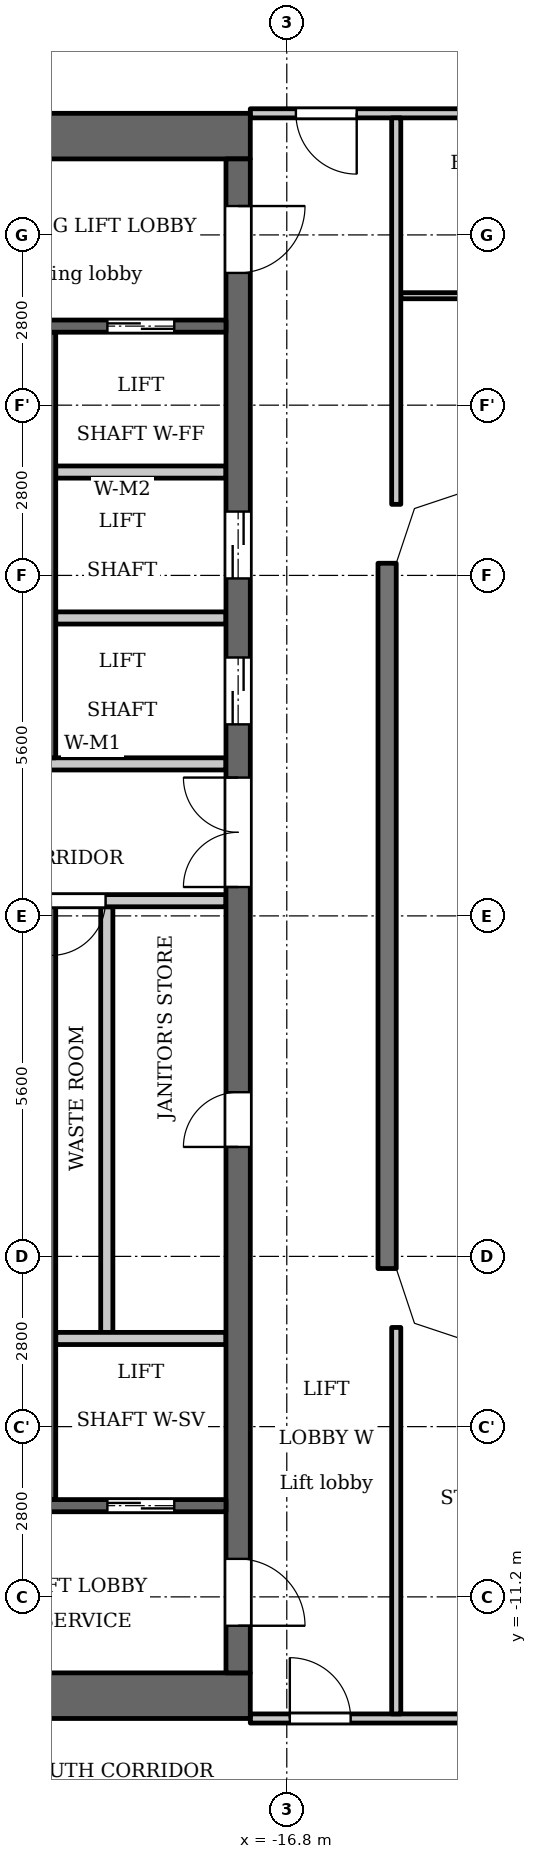
"""IFC4 building model, lengths in metres.
Left out: names, types, materials, properties, quantities, classifications, styles, units other than length and angle.
Written with IfcOpenShell. Run it as: python <this file> out.ifc"""

import sys

from ifc_helpers import new_model, si_unit, direction, frame, frame_2d, origin, place, context, subcontext, project, spatial, polyline, rectangle, outline, extrude, element, fill, save


model = new_model("IFC4")
c1 = context("Model", 3, precision=1e-05, world=origin(), true_north=direction((0.0, 1.0)))
c2 = subcontext(c1, "Body", "Model", "MODEL_VIEW")
j1 = project(units=[si_unit("LENGTHUNIT", "METRE"), si_unit("PLANEANGLEUNIT", "RADIAN")], contexts=[c1])
p1 = place(None, origin())
s1 = spatial("IfcSite", under=j1, at=p1, CompositionType="ELEMENT")
p2 = place(p1, origin())
s2 = spatial("IfcBuilding", under=s1, at=p2, CompositionType="ELEMENT")
p3 = place(p2, frame((0.0, 0.0, 209.9)))
s3 = spatial("IfcBuildingStorey", under=s2, at=p3, CompositionType="ELEMENT", Elevation=209.9)
p4 = place(p3, frame((-15.15, -5.8, 0.0), z_axis=(0.0, 0.0, 1.0), x_axis=(0.0, 1.0, 0.0)))
e1 = element("IfcWall", 1, at=p4, inside=s3, PredefinedType="SOLIDWALL", context=c2, shape_type="SweptSolid", body=[
    extrude(rectangle(XDim=11.6, YDim=0.3, at=frame_2d((5.8, 0.0))), origin(), (0.0, 0.0, 1.0), 3.2),
])
p5 = place(p3, frame((-20.7, 2.6, 0.0), z_axis=(0.0, 0.0, 1.0), x_axis=(0.0, 1.0, 0.0)))
e2 = element("IfcWall", 2, at=p5, inside=s3, PredefinedType="SHEAR", context=c2, shape_type="SweptSolid", body=[
    extrude(rectangle(XDim=7.0, YDim=0.2, at=frame_2d((3.5, 0.0))), origin(), (0.0, 0.0, 1.0), 3.2),
])
p6 = place(p3, frame((-20.7, -9.6, 0.0), z_axis=(0.0, 0.0, 1.0), x_axis=(0.0, 1.0, 0.0)))
e3 = element("IfcWall", 3, at=p6, inside=s3, PredefinedType="SHEAR", context=c2, shape_type="SweptSolid", body=[
    extrude(rectangle(XDim=9.75, YDim=0.2, at=frame_2d((4.875, 0.0))), origin(), (0.0, 0.0, 1.0), 3.2),
])
for number, where, z_axis, x_axis in (
    (4, (-17.4, 12.825, 0.0), (0.0, 0.0, 1.0), (-1.0, 0.0, 0.0)),
    (5, (-17.4, -12.825, 0.0), (0.0, 0.0, 1.0), (-1.0, 0.0, 0.0)),
):
    element("IfcWall", number, at=place(p3, frame(where, z_axis=z_axis, x_axis=x_axis)), inside=s3, PredefinedType="SHEAR", context=c2, shape_type="SweptSolid", body=[
        extrude(rectangle(XDim=7.6, YDim=0.75, at=frame_2d((3.8, 0.0))), origin(), (0.0, 0.0, 1.0), 3.2),
    ])
p7 = place(p3, frame((-19.76, -6.85, 0.0), z_axis=(0.0, 0.0, 1.0), x_axis=(0.0, 1.0, 0.0)))
e6 = element("IfcWall", 6, at=p7, inside=s3, PredefinedType="PARTITIONING", context=c2, shape_type="SweptSolid", body=[
    extrude(rectangle(XDim=7.0, YDim=0.2, at=frame_2d((3.5, 0.0))), origin(), (0.0, 0.0, 1.0), 3.2),
])
p8 = place(p3, frame((-17.6, -12.45, 0.0), z_axis=(0.0, 0.0, 1.0), x_axis=(0.0, 1.0, 0.0)))
e7 = element("IfcWall", 7, at=p8, inside=s3, PredefinedType="SHEAR", context=c2, shape_type="SweptSolid", body=[
    extrude(rectangle(XDim=24.9, YDim=0.4, at=frame_2d((12.45, 0.0))), origin(), (0.0, 0.0, 1.0), 3.2),
])
p9 = place(p8, frame((8.65, 0.0, 0.0)))
e8 = element("IfcOpeningElement", 8, at=p9, cuts=e7, PredefinedType="OPENING", context=c2, shape_type="SweptSolid", body=[
    extrude(rectangle(XDim=0.9, YDim=2.1, at=frame_2d((0.45, 1.05))), frame((0.0, 0.21, 0.0), z_axis=(0.0, -1.0, 0.0), x_axis=(1.0, 0.0, 0.0)), (0.0, 0.0, 1.0), 0.42),
])
p10 = place(p8, frame((15.6, 0.0, 0.0)))
e9 = element("IfcOpeningElement", 9, at=p10, cuts=e7, PredefinedType="OPENING", context=c2, shape_type="SweptSolid", body=[
    extrude(rectangle(XDim=1.1, YDim=2.1, at=frame_2d((0.55, 1.05))), frame((0.0, 0.21, 0.0), z_axis=(0.0, -1.0, 0.0), x_axis=(1.0, 0.0, 0.0)), (0.0, 0.0, 1.0), 0.42),
])
p11 = place(p8, frame((18.0, 0.0, 0.0)))
e10 = element("IfcOpeningElement", 10, at=p11, cuts=e7, PredefinedType="OPENING", context=c2, shape_type="SweptSolid", body=[
    extrude(rectangle(XDim=1.1, YDim=2.1, at=frame_2d((0.55, 1.05))), frame((0.0, 0.21, 0.0), z_axis=(0.0, -1.0, 0.0), x_axis=(1.0, 0.0, 0.0)), (0.0, 0.0, 1.0), 0.42),
])
p12 = place(p8, frame((23.025, 0.0, 0.0)))
e11 = element("IfcOpeningElement", 11, at=p12, cuts=e7, PredefinedType="OPENING", context=c2, shape_type="SweptSolid", body=[
    extrude(rectangle(XDim=1.1, YDim=2.1, at=frame_2d((0.55, 1.05))), frame((0.0, 0.21, 0.0), z_axis=(0.0, -1.0, 0.0), x_axis=(1.0, 0.0, 0.0)), (0.0, 0.0, 1.0), 0.42),
])
p13 = place(p8, frame((0.775, 0.0, 0.0)))
e12 = element("IfcOpeningElement", 12, at=p13, cuts=e7, PredefinedType="OPENING", context=c2, shape_type="SweptSolid", body=[
    extrude(rectangle(XDim=1.1, YDim=2.1, at=frame_2d((0.55, 1.05))), frame((0.0, 0.21, 0.0), z_axis=(0.0, -1.0, 0.0), x_axis=(1.0, 0.0, 0.0)), (0.0, 0.0, 1.0), 0.42),
])
p14 = place(p8, frame((12.925, 0.0, 0.0)))
e13 = element("IfcOpeningElement", 13, at=p14, cuts=e7, PredefinedType="OPENING", context=c2, shape_type="SweptSolid", body=[
    extrude(rectangle(XDim=1.8, YDim=2.1, at=frame_2d((0.9, 1.05))), frame((0.0, 0.21, 0.0), z_axis=(0.0, -1.0, 0.0), x_axis=(1.0, 0.0, 0.0)), (0.0, 0.0, 1.0), 0.42),
])
p15 = place(p3, frame((-17.8, -9.7, 0.0), z_axis=(0.0, 0.0, 1.0), x_axis=(-1.0, 0.0, 0.0)))
e14 = element("IfcWall", 14, at=p15, inside=s3, PredefinedType="SHEAR", context=c2, shape_type="SweptSolid", body=[
    extrude(rectangle(XDim=5.65, YDim=0.2, at=frame_2d((2.825, 0.0))), origin(), (0.0, 0.0, 1.0), 3.2),
])
p16 = place(p15, frame((0.85, 0.0, 0.0)))
e15 = element("IfcOpeningElement", 15, at=p16, cuts=e14, PredefinedType="OPENING", context=c2, shape_type="SweptSolid", body=[
    extrude(rectangle(XDim=1.1, YDim=2.1, at=frame_2d((0.55, 1.05))), frame((0.0, 0.11, 0.0), z_axis=(0.0, -1.0, 0.0), x_axis=(1.0, 0.0, 0.0)), (0.0, 0.0, 1.0), 0.22),
])
p17 = place(p15, frame((3.75, 0.0, 0.0)))
e16 = element("IfcOpeningElement", 16, at=p17, cuts=e14, PredefinedType="OPENING", context=c2, shape_type="SweptSolid", body=[
    extrude(rectangle(XDim=1.1, YDim=2.1, at=frame_2d((0.55, 1.05))), frame((0.0, 0.11, 0.0), z_axis=(0.0, -1.0, 0.0), x_axis=(1.0, 0.0, 0.0)), (0.0, 0.0, 1.0), 0.22),
])
p18 = place(p3, frame((-17.8, -6.95, 0.0), z_axis=(0.0, 0.0, 1.0), x_axis=(-1.0, 0.0, 0.0)))
e17 = element("IfcWall", 17, at=p18, inside=s3, PredefinedType="PARTITIONING", context=c2, shape_type="SweptSolid", body=[
    extrude(rectangle(XDim=2.8, YDim=0.2, at=frame_2d((1.4, 0.0))), origin(), (0.0, 0.0, 1.0), 3.2),
])
p19 = place(p3, frame((-17.8, 0.25, 0.0), z_axis=(0.0, 0.0, 1.0), x_axis=(-1.0, 0.0, 0.0)))
e18 = element("IfcWall", 18, at=p19, inside=s3, PredefinedType="PARTITIONING", context=c2, shape_type="SweptSolid", body=[
    extrude(rectangle(XDim=3.0, YDim=0.2, at=frame_2d((1.5, 0.0))), origin(), (0.0, 0.0, 1.0), 3.2),
])
p20 = place(p19, frame((1.98, 0.0, 0.0)))
e19 = element("IfcOpeningElement", 19, at=p20, cuts=e18, PredefinedType="OPENING", context=c2, shape_type="SweptSolid", body=[
    extrude(rectangle(XDim=0.9, YDim=2.1, at=frame_2d((0.45, 1.05))), frame((0.0, 0.11, 0.0), z_axis=(0.0, -1.0, 0.0), x_axis=(1.0, 0.0, 0.0)), (0.0, 0.0, 1.0), 0.22),
])
p21 = place(p3, frame((-17.8, 2.5, 0.0), z_axis=(0.0, 0.0, 1.0), x_axis=(-1.0, 0.0, 0.0)))
e20 = element("IfcWall", 20, at=p21, inside=s3, PredefinedType="PARTITIONING", context=c2, shape_type="SweptSolid", body=[
    extrude(rectangle(XDim=3.0, YDim=0.2, at=frame_2d((1.5, 0.0))), origin(), (0.0, 0.0, 1.0), 3.2),
])
for number, where, z_axis, x_axis in (
    (21, (-17.8, 4.9, 0.0), (0.0, 0.0, 1.0), (-1.0, 0.0, 0.0)),
    (22, (-17.8, 7.3, 0.0), (0.0, 0.0, 1.0), (-1.0, 0.0, 0.0)),
):
    element("IfcWall", number, at=place(p3, frame(where, z_axis=z_axis, x_axis=x_axis)), inside=s3, PredefinedType="PARTITIONING", context=c2, shape_type="SweptSolid", body=[
        extrude(rectangle(XDim=2.8, YDim=0.2, at=frame_2d((1.4, 0.0))), origin(), (0.0, 0.0, 1.0), 3.2),
    ])
p22 = place(p3, frame((-17.8, 9.7, 0.0), z_axis=(0.0, 0.0, 1.0), x_axis=(-1.0, 0.0, 0.0)))
e23 = element("IfcWall", 23, at=p22, inside=s3, PredefinedType="SHEAR", context=c2, shape_type="SweptSolid", body=[
    extrude(rectangle(XDim=5.65, YDim=0.2, at=frame_2d((2.825, 0.0))), origin(), (0.0, 0.0, 1.0), 3.2),
])
p23 = place(p22, frame((0.85, 0.0, 0.0)))
e24 = element("IfcOpeningElement", 24, at=p23, cuts=e23, PredefinedType="OPENING", context=c2, shape_type="SweptSolid", body=[
    extrude(rectangle(XDim=1.1, YDim=2.1, at=frame_2d((0.55, 1.05))), frame((0.0, 0.11, 0.0), z_axis=(0.0, -1.0, 0.0), x_axis=(1.0, 0.0, 0.0)), (0.0, 0.0, 1.0), 0.22),
])
p24 = place(p22, frame((3.75, 0.0, 0.0)))
e25 = element("IfcOpeningElement", 25, at=p24, cuts=e23, PredefinedType="OPENING", context=c2, shape_type="SweptSolid", body=[
    extrude(rectangle(XDim=1.1, YDim=2.1, at=frame_2d((0.55, 1.05))), frame((0.0, 0.11, 0.0), z_axis=(0.0, -1.0, 0.0), x_axis=(1.0, 0.0, 0.0)), (0.0, 0.0, 1.0), 0.22),
])
p25 = place(p3, frame((-17.4, -13.2, 0.0), z_axis=(0.0, 0.0, 1.0), x_axis=(1.0, 0.0, 0.0)))
e26 = element("IfcWall", 26, at=p25, inside=s3, PredefinedType="PARTITIONING", context=c2, shape_type="SweptSolid", body=[
    extrude(rectangle(XDim=34.8, YDim=0.15, at=frame_2d((17.4, 0.0))), origin(), (0.0, 0.0, 1.0), 3.2),
])
p26 = place(p25, frame((0.65, 0.0, 0.0)))
e27 = element("IfcOpeningElement", 27, at=p26, cuts=e26, PredefinedType="OPENING", context=c2, shape_type="SweptSolid", body=[
    extrude(rectangle(XDim=1.0, YDim=2.1, at=frame_2d((0.5, 1.05))), frame((0.0, 0.085, 0.0), z_axis=(0.0, -1.0, 0.0), x_axis=(1.0, 0.0, 0.0)), (0.0, 0.0, 1.0), 0.17),
])
p27 = place(p25, frame((33.05, 0.0, 0.0)))
e28 = element("IfcOpeningElement", 28, at=p27, cuts=e26, PredefinedType="OPENING", context=c2, shape_type="SweptSolid", body=[
    extrude(rectangle(XDim=1.0, YDim=2.1, at=frame_2d((0.5, 1.05))), frame((0.0, 0.085, 0.0), z_axis=(0.0, -1.0, 0.0), x_axis=(1.0, 0.0, 0.0)), (0.0, 0.0, 1.0), 0.17),
])
p28 = place(p25, frame((4.55, 0.0, 0.0)))
e29 = element("IfcOpeningElement", 29, at=p28, cuts=e26, PredefinedType="OPENING", context=c2, shape_type="SweptSolid", body=[
    extrude(rectangle(XDim=1.0, YDim=2.1, at=frame_2d((0.5, 1.05))), frame((0.0, 0.085, 0.0), z_axis=(0.0, -1.0, 0.0), x_axis=(1.0, 0.0, 0.0)), (0.0, 0.0, 1.0), 0.17),
])
p29 = place(p25, frame((6.9, 0.0, 0.0)))
e30 = element("IfcOpeningElement", 30, at=p29, cuts=e26, PredefinedType="OPENING", context=c2, shape_type="SweptSolid", body=[
    extrude(rectangle(XDim=1.0, YDim=2.1, at=frame_2d((0.5, 1.05))), frame((0.0, 0.085, 0.0), z_axis=(0.0, -1.0, 0.0), x_axis=(1.0, 0.0, 0.0)), (0.0, 0.0, 1.0), 0.17),
])
p30 = place(p25, frame((15.75, 0.0, 0.0)))
e31 = element("IfcOpeningElement", 31, at=p30, cuts=e26, PredefinedType="OPENING", context=c2, shape_type="SweptSolid", body=[
    extrude(rectangle(XDim=1.0, YDim=2.1, at=frame_2d((0.5, 1.05))), frame((0.0, 0.085, 0.0), z_axis=(0.0, -1.0, 0.0), x_axis=(1.0, 0.0, 0.0)), (0.0, 0.0, 1.0), 0.17),
])
p31 = place(p25, frame((18.1, 0.0, 0.0)))
e32 = element("IfcOpeningElement", 32, at=p31, cuts=e26, PredefinedType="OPENING", context=c2, shape_type="SweptSolid", body=[
    extrude(rectangle(XDim=1.0, YDim=2.1, at=frame_2d((0.5, 1.05))), frame((0.0, 0.085, 0.0), z_axis=(0.0, -1.0, 0.0), x_axis=(1.0, 0.0, 0.0)), (0.0, 0.0, 1.0), 0.17),
])
p32 = place(p25, frame((26.95, 0.0, 0.0)))
e33 = element("IfcOpeningElement", 33, at=p32, cuts=e26, PredefinedType="OPENING", context=c2, shape_type="SweptSolid", body=[
    extrude(rectangle(XDim=1.0, YDim=2.1, at=frame_2d((0.5, 1.05))), frame((0.0, 0.085, 0.0), z_axis=(0.0, -1.0, 0.0), x_axis=(1.0, 0.0, 0.0)), (0.0, 0.0, 1.0), 0.17),
])
p33 = place(p25, frame((29.25, 0.0, 0.0)))
e34 = element("IfcOpeningElement", 34, at=p33, cuts=e26, PredefinedType="OPENING", context=c2, shape_type="SweptSolid", body=[
    extrude(rectangle(XDim=1.0, YDim=2.1, at=frame_2d((0.5, 1.05))), frame((0.0, 0.085, 0.0), z_axis=(0.0, -1.0, 0.0), x_axis=(1.0, 0.0, 0.0)), (0.0, 0.0, 1.0), 0.17),
])
p34 = place(p3, frame((-14.925, 10.2, 0.0), z_axis=(0.0, 0.0, 1.0), x_axis=(1.0, 0.0, 0.0)))
e35 = element("IfcWall", 35, at=p34, inside=s3, PredefinedType="PARTITIONING", context=c2, shape_type="SweptSolid", body=[
    extrude(rectangle(XDim=29.85, YDim=0.1, at=frame_2d((14.925, 0.0))), origin(), (0.0, 0.0, 1.0), 3.2),
])
p35 = place(p34, frame((13.475, 0.0, 0.0)))
e36 = element("IfcOpeningElement", 36, at=p35, cuts=e35, PredefinedType="OPENING", context=c2, shape_type="SweptSolid", body=[
    extrude(rectangle(XDim=0.9, YDim=2.1, at=frame_2d((0.45, 1.05))), frame((0.0, 0.06, 0.0), z_axis=(0.0, -1.0, 0.0), x_axis=(1.0, 0.0, 0.0)), (0.0, 0.0, 1.0), 0.12),
])
p36 = place(p34, frame((4.375, 0.0, 0.0)))
e37 = element("IfcOpeningElement", 37, at=p36, cuts=e35, PredefinedType="OPENING", context=c2, shape_type="SweptSolid", body=[
    extrude(rectangle(XDim=0.9, YDim=2.1, at=frame_2d((0.45, 1.05))), frame((0.0, 0.06, 0.0), z_axis=(0.0, -1.0, 0.0), x_axis=(1.0, 0.0, 0.0)), (0.0, 0.0, 1.0), 0.12),
])
p37 = place(p34, frame((19.075, 0.0, 0.0)))
e38 = element("IfcOpeningElement", 38, at=p37, cuts=e35, PredefinedType="OPENING", context=c2, shape_type="SweptSolid", body=[
    extrude(rectangle(XDim=0.9, YDim=2.1, at=frame_2d((0.45, 1.05))), frame((0.0, 0.06, 0.0), z_axis=(0.0, -1.0, 0.0), x_axis=(1.0, 0.0, 0.0)), (0.0, 0.0, 1.0), 0.12),
])
p38 = place(p34, frame((21.175, 0.0, 0.0)))
e39 = element("IfcOpeningElement", 39, at=p38, cuts=e35, PredefinedType="OPENING", context=c2, shape_type="SweptSolid", body=[
    extrude(rectangle(XDim=0.9, YDim=2.1, at=frame_2d((0.45, 1.05))), frame((0.0, 0.06, 0.0), z_axis=(0.0, -1.0, 0.0), x_axis=(1.0, 0.0, 0.0)), (0.0, 0.0, 1.0), 0.12),
])
p39 = place(p3, frame((-17.4, 13.2, 0.0), z_axis=(0.0, 0.0, 1.0), x_axis=(1.0, 0.0, 0.0)))
e40 = element("IfcWall", 40, at=p39, inside=s3, PredefinedType="PARTITIONING", context=c2, shape_type="SweptSolid", body=[
    extrude(rectangle(XDim=34.8, YDim=0.15, at=frame_2d((17.4, 0.0))), origin(), (0.0, 0.0, 1.0), 3.2),
])
p40 = place(p39, frame((0.75, 0.0, 0.0)))
e41 = element("IfcOpeningElement", 41, at=p40, cuts=e40, PredefinedType="OPENING", context=c2, shape_type="SweptSolid", body=[
    extrude(rectangle(XDim=1.0, YDim=2.1, at=frame_2d((0.5, 1.05))), frame((0.0, 0.085, 0.0), z_axis=(0.0, -1.0, 0.0), x_axis=(1.0, 0.0, 0.0)), (0.0, 0.0, 1.0), 0.17),
])
p41 = place(p39, frame((33.15, 0.0, 0.0)))
e42 = element("IfcOpeningElement", 42, at=p41, cuts=e40, PredefinedType="OPENING", context=c2, shape_type="SweptSolid", body=[
    extrude(rectangle(XDim=1.0, YDim=2.1, at=frame_2d((0.5, 1.05))), frame((0.0, 0.085, 0.0), z_axis=(0.0, -1.0, 0.0), x_axis=(1.0, 0.0, 0.0)), (0.0, 0.0, 1.0), 0.17),
])
p42 = place(p39, frame((12.45, 0.0, 0.0)))
e43 = element("IfcOpeningElement", 43, at=p42, cuts=e40, PredefinedType="OPENING", context=c2, shape_type="SweptSolid", body=[
    extrude(rectangle(XDim=1.0, YDim=2.1, at=frame_2d((0.5, 1.05))), frame((0.0, 0.085, 0.0), z_axis=(0.0, -1.0, 0.0), x_axis=(1.0, 0.0, 0.0)), (0.0, 0.0, 1.0), 0.17),
])
p43 = place(p39, frame((18.05, 0.0, 0.0)))
e44 = element("IfcOpeningElement", 44, at=p43, cuts=e40, PredefinedType="OPENING", context=c2, shape_type="SweptSolid", body=[
    extrude(rectangle(XDim=1.0, YDim=2.1, at=frame_2d((0.5, 1.05))), frame((0.0, 0.085, 0.0), z_axis=(0.0, -1.0, 0.0), x_axis=(1.0, 0.0, 0.0)), (0.0, 0.0, 1.0), 0.17),
])
for number, where, z_axis, x_axis in (
    (45, (-15.0, -13.125, 0.0), (0.0, 0.0, 1.0), (0.0, 1.0, 0.0)),
    (46, (-15.0, 6.769, 0.0), (0.0, 0.0, 1.0), (0.0, 1.0, 0.0)),
):
    element("IfcWall", number, at=place(p3, frame(where, z_axis=z_axis, x_axis=x_axis)), inside=s3, PredefinedType="PARTITIONING", context=c2, shape_type="SweptSolid", body=[
        extrude(rectangle(XDim=6.356, YDim=0.15, at=frame_2d((3.178, 0.0))), origin(), (0.0, 0.0, 1.0), 3.2),
    ])
p44 = place(p3, origin())
e47 = element("IfcWall", 47, at=p44, inside=s3, PredefinedType="SOLIDWALL", context=c2, shape_type="SweptSolid", body=[
    extrude(outline(polyline([(-13.849, 7.3), (-14.937, 6.937), (-15.3, 5.849), (-15.3, 5.8), (-15.0, 5.8), (-14.7, 6.7), (-13.8, 7.0), (-13.8, 7.3), (-13.849, 7.3)])), origin(), (0.0, 0.0, 1.0), 3.2),
])
e48 = element("IfcWall", 48, at=p44, inside=s3, PredefinedType="SOLIDWALL", context=c2, shape_type="SweptSolid", body=[
    extrude(outline(polyline([(-14.937, -6.937), (-13.849, -7.3), (-13.8, -7.3), (-13.8, -7.0), (-14.7, -6.7), (-15.0, -5.8), (-15.3, -5.8), (-15.3, -5.849), (-14.937, -6.937)])), origin(), (0.0, 0.0, 1.0), 3.2),
])
p45 = place(p16, origin())
e49 = element("IfcDoor", 49, at=p45, inside=s3, OperationType="DOUBLE_DOOR_SLIDING", PredefinedType="DOOR", context=c2, shape_type="SweptSolid", body=[
    extrude(rectangle(XDim=1.1, YDim=2.1, at=frame_2d((0.55, 1.05))), frame((0.0, 0.025, 0.0), z_axis=(0.0, -1.0, 0.0), x_axis=(1.0, 0.0, 0.0)), (0.0, 0.0, 1.0), 0.05),
])
fill(e15, e49)
p46 = place(p9, origin())
e50 = element("IfcDoor", 50, at=p46, inside=s3, OperationType="SINGLE_SWING_RIGHT", PredefinedType="DOOR", context=c2, shape_type="SweptSolid", body=[
    extrude(rectangle(XDim=0.9, YDim=2.1, at=frame_2d((0.45, 1.05))), frame((0.0, 0.025, 0.0), z_axis=(0.0, -1.0, 0.0), x_axis=(1.0, 0.0, 0.0)), (0.0, 0.0, 1.0), 0.05),
])
fill(e8, e50)
p47 = place(p20, origin())
e51 = element("IfcDoor", 51, at=p47, inside=s3, OperationType="SINGLE_SWING_LEFT", PredefinedType="DOOR", context=c2, shape_type="SweptSolid", body=[
    extrude(rectangle(XDim=0.9, YDim=2.1, at=frame_2d((0.45, 1.05))), frame((0.0, 0.025, 0.0), z_axis=(0.0, -1.0, 0.0), x_axis=(1.0, 0.0, 0.0)), (0.0, 0.0, 1.0), 0.05),
])
fill(e19, e51)
p48 = place(p10, origin())
e52 = element("IfcDoor", 52, at=p48, inside=s3, OperationType="DOUBLE_DOOR_SLIDING", PredefinedType="DOOR", context=c2, shape_type="SweptSolid", body=[
    extrude(rectangle(XDim=1.1, YDim=2.1, at=frame_2d((0.55, 1.05))), frame((0.0, 0.025, 0.0), z_axis=(0.0, -1.0, 0.0), x_axis=(1.0, 0.0, 0.0)), (0.0, 0.0, 1.0), 0.05),
])
fill(e9, e52)
p49 = place(p11, origin())
e53 = element("IfcDoor", 53, at=p49, inside=s3, OperationType="DOUBLE_DOOR_SLIDING", PredefinedType="DOOR", context=c2, shape_type="SweptSolid", body=[
    extrude(rectangle(XDim=1.1, YDim=2.1, at=frame_2d((0.55, 1.05))), frame((0.0, 0.025, 0.0), z_axis=(0.0, -1.0, 0.0), x_axis=(1.0, 0.0, 0.0)), (0.0, 0.0, 1.0), 0.05),
])
fill(e10, e53)
p50 = place(p23, origin())
e54 = element("IfcDoor", 54, at=p50, inside=s3, OperationType="DOUBLE_DOOR_SLIDING", PredefinedType="DOOR", context=c2, shape_type="SweptSolid", body=[
    extrude(rectangle(XDim=1.1, YDim=2.1, at=frame_2d((0.55, 1.05))), frame((0.0, 0.025, 0.0), z_axis=(0.0, -1.0, 0.0), x_axis=(1.0, 0.0, 0.0)), (0.0, 0.0, 1.0), 0.05),
])
fill(e24, e54)
p51 = place(p12, origin())
e55 = element("IfcDoor", 55, at=p51, inside=s3, OperationType="SINGLE_SWING_RIGHT", PredefinedType="DOOR", context=c2, shape_type="SweptSolid", body=[
    extrude(rectangle(XDim=1.1, YDim=2.1, at=frame_2d((0.55, 1.05))), frame((0.0, 0.025, 0.0), z_axis=(0.0, -1.0, 0.0), x_axis=(1.0, 0.0, 0.0)), (0.0, 0.0, 1.0), 0.05),
])
fill(e11, e55)
p52 = place(p13, origin())
e56 = element("IfcDoor", 56, at=p52, inside=s3, OperationType="SINGLE_SWING_LEFT", PredefinedType="DOOR", context=c2, shape_type="SweptSolid", body=[
    extrude(rectangle(XDim=1.1, YDim=2.1, at=frame_2d((0.55, 1.05))), frame((0.0, 0.025, 0.0), z_axis=(0.0, -1.0, 0.0), x_axis=(1.0, 0.0, 0.0)), (0.0, 0.0, 1.0), 0.05),
])
fill(e12, e56)
p53 = place(p14, origin())
e57 = element("IfcDoor", 57, at=p53, inside=s3, OperationType="DOUBLE_DOOR_SINGLE_SWING", PredefinedType="DOOR", context=c2, shape_type="SweptSolid", body=[
    extrude(rectangle(XDim=1.8, YDim=2.1, at=frame_2d((0.9, 1.05))), frame((0.0, 0.025, 0.0), z_axis=(0.0, -1.0, 0.0), x_axis=(1.0, 0.0, 0.0)), (0.0, 0.0, 1.0), 0.05),
])
fill(e13, e57)
p54 = place(p40, origin())
e58 = element("IfcDoor", 58, at=p54, inside=s3, OperationType="SINGLE_SWING_RIGHT", PredefinedType="DOOR", context=c2, shape_type="SweptSolid", body=[
    extrude(rectangle(XDim=1.0, YDim=2.1, at=frame_2d((0.5, 1.05))), frame((0.0, 0.025, 0.0), z_axis=(0.0, -1.0, 0.0), x_axis=(1.0, 0.0, 0.0)), (0.0, 0.0, 1.0), 0.05),
])
fill(e41, e58)
p55 = place(p26, origin())
e59 = element("IfcDoor", 59, at=p55, inside=s3, OperationType="SINGLE_SWING_RIGHT", PredefinedType="DOOR", context=c2, shape_type="SweptSolid", body=[
    extrude(rectangle(XDim=1.0, YDim=2.1, at=frame_2d((0.5, 1.05))), frame((0.0, 0.025, 0.0), z_axis=(0.0, -1.0, 0.0), x_axis=(1.0, 0.0, 0.0)), (0.0, 0.0, 1.0), 0.05),
])
fill(e27, e59)
save(model, sys.argv[1])
